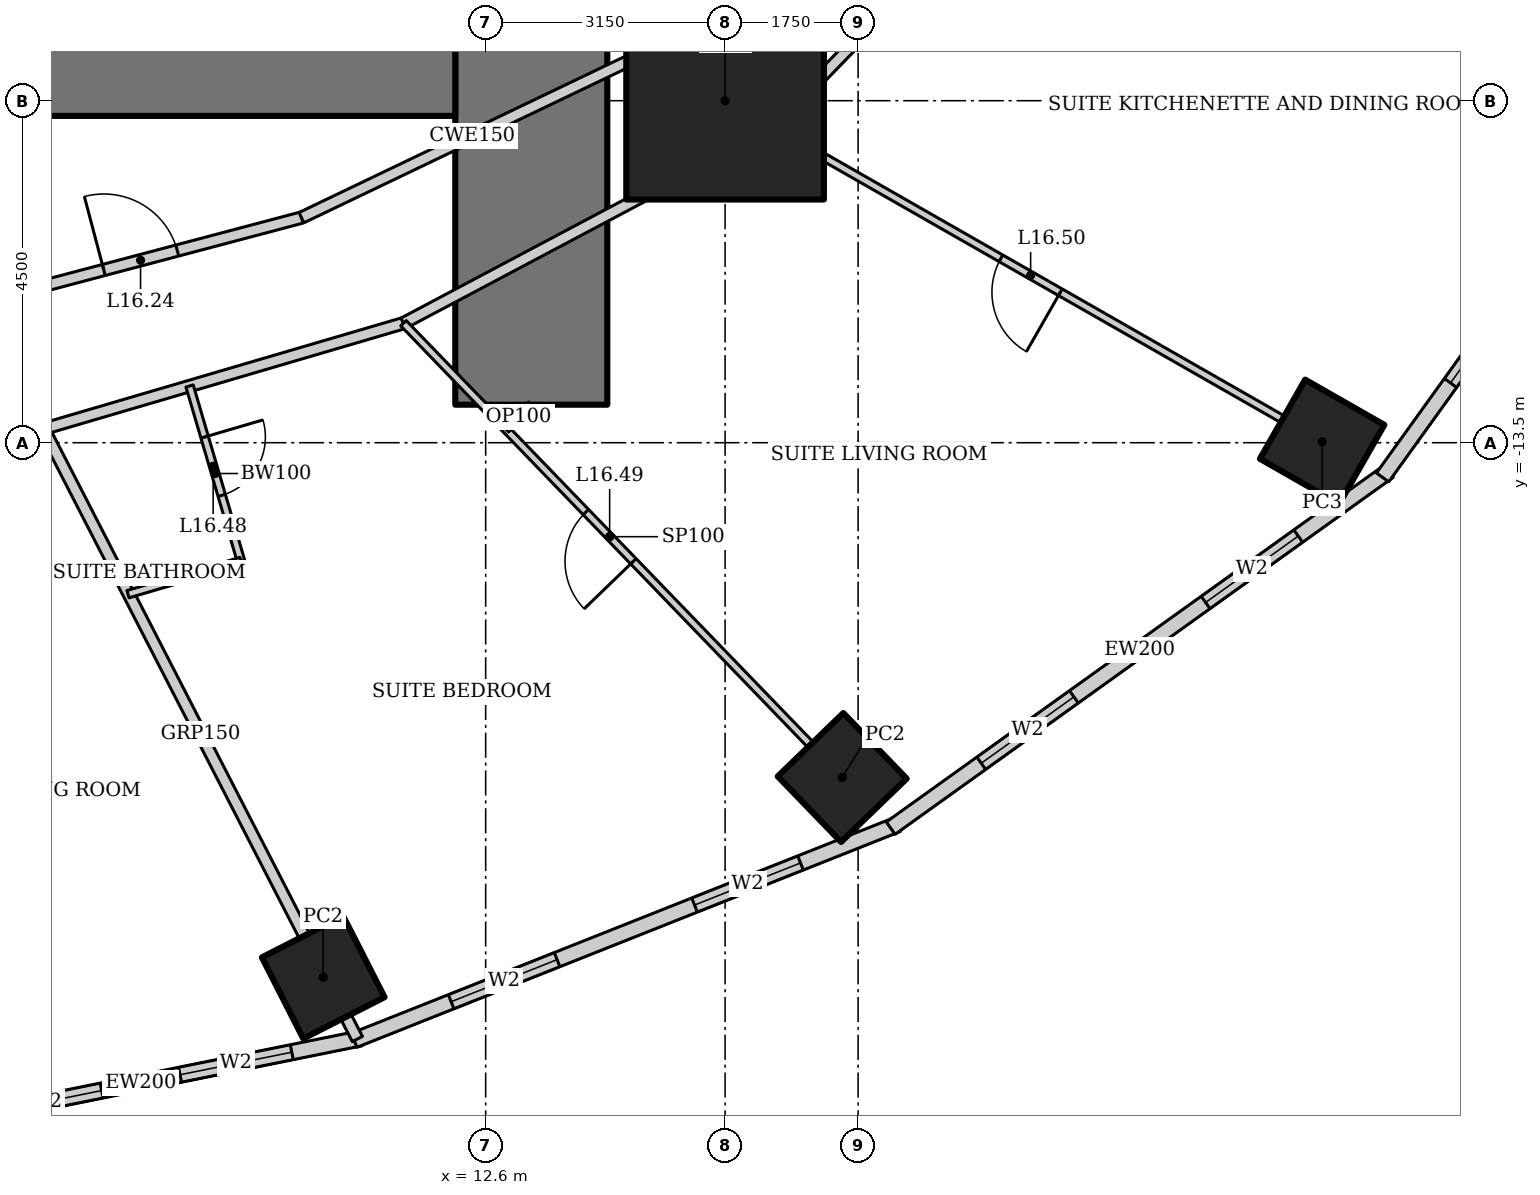
"""IFC4 building model, lengths in metres.
Left out: names, types, materials, properties, quantities, classifications, styles, units other than length and angle.
Written with IfcOpenShell. Run it as: python <this file> out.ifc"""

import sys

from ifc_helpers import new_model, si_unit, direction, frame, frame_2d, origin, origin_2d, place, context, subcontext, project, spatial, rectangle, hollow_rectangle, extrude, element, fill, save


model = new_model("IFC4")
c1 = context("Model", 3, precision=1e-05, world=origin(), true_north=direction((0.0, 1.0)))
c2 = subcontext(c1, "Body", "Model", "MODEL_VIEW")
j1 = project(units=[si_unit("LENGTHUNIT", "METRE"), si_unit("PLANEANGLEUNIT", "RADIAN")], contexts=[c1])
p1 = place(None, origin())
s1 = spatial("IfcSite", under=j1, at=p1, CompositionType="ELEMENT")
p2 = place(p1, origin())
s2 = spatial("IfcBuilding", under=s1, at=p2, CompositionType="ELEMENT")
p3 = place(p2, frame((0.0, 0.0, 73.0)))
s3 = spatial("IfcBuildingStorey", under=s2, at=p3, CompositionType="ELEMENT", Elevation=73.0)
p4 = place(p3, frame((15.75, -9.0, 0.0), z_axis=(0.0, 0.0, 1.0), x_axis=(1.0, 0.0, 0.0)))
e1 = element("IfcColumn", 1, at=p4, inside=s3, PredefinedType="COLUMN", context=c2, shape_type="SweptSolid", body=[
    extrude(hollow_rectangle(XDim=2.6, YDim=2.6, WallThickness=0.13, at=origin_2d()), origin(), (0.0, 0.0, 1.0), 3.6),
])
for number, where, z_axis, x_axis in (
    (2, (10.463, -20.534, 0.0), (0.0, 0.0, 1.0), (0.891, 0.454, 0.0)),
    (3, (17.291, -17.905, 0.0), (0.0, 0.0, 1.0), (0.719, 0.695, 0.0)),
):
    element("IfcColumn", number, at=place(p3, frame(where, z_axis=z_axis, x_axis=x_axis)), inside=s3, PredefinedType="COLUMN", context=c2, shape_type="SweptSolid", body=[
        extrude(hollow_rectangle(XDim=1.2, YDim=1.2, WallThickness=0.1, at=origin_2d()), origin(), (0.0, 0.0, 1.0), 3.6),
    ])
p5 = place(p3, frame((23.605, -13.489, 0.0), z_axis=(0.0, 0.0, 1.0), x_axis=(0.496139221777, 0.86824298017, 0.0)))
e4 = element("IfcColumn", 4, at=p5, inside=s3, PredefinedType="COLUMN", context=c2, shape_type="SweptSolid", body=[
    extrude(hollow_rectangle(XDim=1.2, YDim=1.2, WallThickness=0.12, at=origin_2d()), origin(), (0.0, 0.0, 1.0), 3.6),
])
p6 = place(p3, frame((13.2, -13.0, 0.0), z_axis=(0.0, 0.0, 1.0), x_axis=(0.0, 1.0, 0.0)))
e5 = element("IfcWall", 5, at=p6, inside=s3, PredefinedType="SHEAR", context=c2, shape_type="SweptSolid", body=[
    extrude(rectangle(XDim=26.0, YDim=2.0, at=frame_2d((13.0, 0.0))), origin(), (0.0, 0.0, 1.0), 3.6),
])
p7 = place(p6, frame((12.1, 0.0, 0.0)))
e6 = element("IfcOpeningElement", 6, at=p7, cuts=e5, PredefinedType="OPENING", context=c2, shape_type="SweptSolid", body=[
    extrude(rectangle(XDim=1.8, YDim=2.1, at=frame_2d((0.9, 1.05))), frame((0.0, 1.01, 0.0), z_axis=(0.0, -1.0, 0.0), x_axis=(1.0, 0.0, 0.0)), (0.0, 0.0, 1.0), 2.02),
])
p8 = place(p3, frame((-12.2, -8.0, 0.0), z_axis=(0.0, 0.0, 1.0), x_axis=(1.0, 0.0, 0.0)))
e7 = element("IfcWall", 7, at=p8, inside=s3, PredefinedType="SHEAR", context=c2, shape_type="SweptSolid", body=[
    extrude(rectangle(XDim=24.4, YDim=2.4, at=frame_2d((12.2, 0.0))), origin(), (0.0, 0.0, 1.0), 3.6),
])
p9 = place(p3, frame((5.17, -22.504, 0.0), z_axis=(0.0, 0.0, 1.0), x_axis=(0.980251657452, 0.197754110105, 0.0)))
e8 = element("IfcWall", 8, at=p9, inside=s3, PredefinedType="SOLIDWALL", context=c2, shape_type="SweptSolid", body=[
    extrude(rectangle(XDim=5.904, YDim=0.2, at=frame_2d((2.952, 0.0))), origin(), (0.0, 0.0, 1.0), 3.45),
])
p10 = place(p9, frame((0.926, 0.0, 0.5)))
e9 = element("IfcOpeningElement", 9, at=p10, cuts=e8, PredefinedType="OPENING", context=c2, shape_type="SweptSolid", body=[
    extrude(rectangle(XDim=1.5, YDim=2.2, at=frame_2d((0.75, 1.1))), frame((0.0, 0.11, 0.0), z_axis=(0.0, -1.0, 0.0), x_axis=(1.0, 0.0, 0.0)), (0.0, 0.0, 1.0), 0.22),
])
p11 = place(p9, frame((3.478, 0.0, 0.5)))
e10 = element("IfcOpeningElement", 10, at=p11, cuts=e8, PredefinedType="OPENING", context=c2, shape_type="SweptSolid", body=[
    extrude(rectangle(XDim=1.5, YDim=2.2, at=frame_2d((0.75, 1.1))), frame((0.0, 0.11, 0.0), z_axis=(0.0, -1.0, 0.0), x_axis=(1.0, 0.0, 0.0)), (0.0, 0.0, 1.0), 0.22),
])
p12 = place(p3, frame((10.869, -21.363, 0.0), z_axis=(0.0, 0.0, 1.0), x_axis=(0.929358351251, 0.369178892895, 0.0)))
e11 = element("IfcWall", 11, at=p12, inside=s3, PredefinedType="SOLIDWALL", context=c2, shape_type="SweptSolid", body=[
    extrude(rectangle(XDim=7.692, YDim=0.2, at=frame_2d((3.846, 0.0))), origin(), (0.0, 0.0, 1.0), 3.45),
])
p13 = place(p12, frame((1.373, 0.0, 0.5)))
e12 = element("IfcOpeningElement", 12, at=p13, cuts=e11, PredefinedType="OPENING", context=c2, shape_type="SweptSolid", body=[
    extrude(rectangle(XDim=1.5, YDim=2.2, at=frame_2d((0.75, 1.1))), frame((0.0, 0.11, 0.0), z_axis=(0.0, -1.0, 0.0), x_axis=(1.0, 0.0, 0.0)), (0.0, 0.0, 1.0), 0.22),
])
p14 = place(p12, frame((4.819, 0.0, 0.5)))
e13 = element("IfcOpeningElement", 13, at=p14, cuts=e11, PredefinedType="OPENING", context=c2, shape_type="SweptSolid", body=[
    extrude(rectangle(XDim=1.5, YDim=2.2, at=frame_2d((0.75, 1.1))), frame((0.0, 0.11, 0.0), z_axis=(0.0, -1.0, 0.0), x_axis=(1.0, 0.0, 0.0)), (0.0, 0.0, 1.0), 0.22),
])
p15 = place(p3, frame((17.929, -18.572, 0.0), z_axis=(0.0, 0.0, 1.0), x_axis=(0.812791321576, 0.582554948112, 0.0)))
e14 = element("IfcWall", 14, at=p15, inside=s3, PredefinedType="SOLIDWALL", context=c2, shape_type="SweptSolid", body=[
    extrude(rectangle(XDim=8.063, YDim=0.2, at=frame_2d((4.032, 0.0))), origin(), (0.0, 0.0, 1.0), 3.45),
])
p16 = place(p15, frame((1.466, 0.0, 0.5)))
e15 = element("IfcOpeningElement", 15, at=p16, cuts=e14, PredefinedType="OPENING", context=c2, shape_type="SweptSolid", body=[
    extrude(rectangle(XDim=1.5, YDim=2.2, at=frame_2d((0.75, 1.1))), frame((0.0, 0.11, 0.0), z_axis=(0.0, -1.0, 0.0), x_axis=(1.0, 0.0, 0.0)), (0.0, 0.0, 1.0), 0.22),
])
p17 = place(p15, frame((5.097, 0.0, 0.5)))
e16 = element("IfcOpeningElement", 16, at=p17, cuts=e14, PredefinedType="OPENING", context=c2, shape_type="SweptSolid", body=[
    extrude(rectangle(XDim=1.5, YDim=2.2, at=frame_2d((0.75, 1.1))), frame((0.0, 0.11, 0.0), z_axis=(0.0, -1.0, 0.0), x_axis=(1.0, 0.0, 0.0)), (0.0, 0.0, 1.0), 0.22),
])
p18 = place(p3, frame((24.4, -13.957, 0.0), z_axis=(0.0, 0.0, 1.0), x_axis=(0.583937613703, 0.811798536155, 0.0)))
e17 = element("IfcWall", 17, at=p18, inside=s3, PredefinedType="SOLIDWALL", context=c2, shape_type="SweptSolid", body=[
    extrude(rectangle(XDim=8.323, YDim=0.2, at=frame_2d((4.162, 0.0))), origin(), (0.0, 0.0, 1.0), 3.45),
])
p19 = place(p18, frame((1.531, 0.0, 0.5)))
e18 = element("IfcOpeningElement", 18, at=p19, cuts=e17, PredefinedType="OPENING", context=c2, shape_type="SweptSolid", body=[
    extrude(rectangle(XDim=1.5, YDim=2.2, at=frame_2d((0.75, 1.1))), frame((0.0, 0.11, 0.0), z_axis=(0.0, -1.0, 0.0), x_axis=(1.0, 0.0, 0.0)), (0.0, 0.0, 1.0), 0.22),
])
p20 = place(p18, frame((5.292, 0.0, 0.5)))
e19 = element("IfcOpeningElement", 19, at=p20, cuts=e17, PredefinedType="OPENING", context=c2, shape_type="SweptSolid", body=[
    extrude(rectangle(XDim=1.5, YDim=2.2, at=frame_2d((0.75, 1.1))), frame((0.0, 0.11, 0.0), z_axis=(0.0, -1.0, 0.0), x_axis=(1.0, 0.0, 0.0)), (0.0, 0.0, 1.0), 0.22),
])
p21 = place(p3, frame((10.912, -21.346, 0.0), z_axis=(0.0, 0.0, 1.0), x_axis=(-0.457117602022, 0.889406261458, 0.0)))
e20 = element("IfcWall", 20, at=p21, inside=s3, PredefinedType="PARTITIONING", context=c2, shape_type="SweptSolid", body=[
    extrude(rectangle(XDim=9.027, YDim=0.15, at=frame_2d((4.513, 0.0))), origin(), (0.0, 0.0, 1.0), 2.528),
])
p22 = place(p3, frame((6.786, -13.317, 0.0), z_axis=(0.0, 0.0, 1.0), x_axis=(0.959496227294, 0.281721475589, 0.0)))
e21 = element("IfcWall", 21, at=p22, inside=s3, PredefinedType="PARTITIONING", context=c2, shape_type="SweptSolid", body=[
    extrude(rectangle(XDim=4.933, YDim=0.15, at=frame_2d((2.466, 0.0))), origin(), (0.0, 0.0, 1.0), 3.45),
])
p23 = place(p3, frame((11.519, -11.928, 0.0), z_axis=(0.0, 0.0, 1.0), x_axis=(0.883334368785, 0.468743419071, 0.0)))
e22 = element("IfcWall", 22, at=p23, inside=s3, PredefinedType="PARTITIONING", context=c2, shape_type="SweptSolid", body=[
    extrude(rectangle(XDim=5.491, YDim=0.15, at=frame_2d((2.746, 0.0))), origin(), (0.0, 0.0, 1.0), 3.45),
])
p24 = place(p3, frame((16.369, -9.354, 0.0), z_axis=(0.0, 0.0, 1.0), x_axis=(0.695871090686, 0.71816671125, 0.0)))
e23 = element("IfcWall", 23, at=p24, inside=s3, PredefinedType="PARTITIONING", context=c2, shape_type="SweptSolid", body=[
    extrude(rectangle(XDim=5.913, YDim=0.15, at=frame_2d((2.957, 0.0))), origin(), (0.0, 0.0, 1.0), 3.45),
])
p25 = place(p24, frame((4.863, 0.0, 0.0)))
e24 = element("IfcOpeningElement", 24, at=p25, cuts=e23, PredefinedType="OPENING", context=c2, shape_type="SweptSolid", body=[
    extrude(rectangle(XDim=0.9, YDim=2.1, at=frame_2d((0.45, 1.05))), frame((0.0, 0.085, 0.0), z_axis=(0.0, -1.0, 0.0), x_axis=(1.0, 0.0, 0.0)), (0.0, 0.0, 1.0), 0.17),
])
p26 = place(p3, frame((5.941, -11.66, 0.0), z_axis=(0.0, 0.0, 1.0), x_axis=(0.966672790407, 0.256015070428, 0.0)))
e25 = element("IfcWall", 25, at=p26, inside=s3, PredefinedType="PARTITIONING", context=c2, shape_type="SweptSolid", body=[
    extrude(rectangle(XDim=4.382, YDim=0.15, at=frame_2d((2.191, 0.0))), origin(), (0.0, 0.0, 1.0), 3.45),
])
p27 = place(p26, frame((1.691, 0.0, 0.0)))
e26 = element("IfcOpeningElement", 26, at=p27, cuts=e25, PredefinedType="OPENING", context=c2, shape_type="SweptSolid", body=[
    extrude(rectangle(XDim=1.0, YDim=2.1, at=frame_2d((0.5, 1.05))), frame((0.0, 0.085, 0.0), z_axis=(0.0, -1.0, 0.0), x_axis=(1.0, 0.0, 0.0)), (0.0, 0.0, 1.0), 0.17),
])
p28 = place(p3, frame((10.177, -10.539, 0.0), z_axis=(0.0, 0.0, 1.0), x_axis=(0.901869692799, 0.43200816799, 0.0)))
e27 = element("IfcWall", 27, at=p28, inside=s3, PredefinedType="PARTITIONING", context=c2, shape_type="SweptSolid", body=[
    extrude(rectangle(XDim=4.986, YDim=0.15, at=frame_2d((2.493, 0.0))), origin(), (0.0, 0.0, 1.0), 3.45),
])
p29 = place(p3, frame((14.673, -8.385, 0.0), z_axis=(0.0, 0.0, 1.0), x_axis=(0.731260145007, 0.682098673452, 0.0)))
e28 = element("IfcWall", 28, at=p29, inside=s3, PredefinedType="PARTITIONING", context=c2, shape_type="SweptSolid", body=[
    extrude(rectangle(XDim=5.468, YDim=0.15, at=frame_2d((2.734, 0.0))), origin(), (0.0, 0.0, 1.0), 3.45),
])
p30 = place(p29, frame((2.234, 0.0, 0.0)))
e29 = element("IfcOpeningElement", 29, at=p30, cuts=e28, PredefinedType="OPENING", context=c2, shape_type="SweptSolid", body=[
    extrude(rectangle(XDim=1.0, YDim=2.1, at=frame_2d((0.5, 1.05))), frame((0.0, 0.085, 0.0), z_axis=(0.0, -1.0, 0.0), x_axis=(1.0, 0.0, 0.0)), (0.0, 0.0, 1.0), 0.17),
])
p31 = place(p3, frame((8.705, -12.754, 0.0), z_axis=(0.0, 0.0, 1.0), x_axis=(0.281659633817, -0.959514382736, 0.0)))
e30 = element("IfcWall", 30, at=p31, inside=s3, PredefinedType="PARTITIONING", context=c2, shape_type="SweptSolid", body=[
    extrude(rectangle(XDim=2.4, YDim=0.1, at=frame_2d((1.2, 0.0))), origin(), (0.0, 0.0, 1.0), 3.45),
])
p32 = place(p31, frame((0.7, 0.0, 0.0)))
e31 = element("IfcOpeningElement", 31, at=p32, cuts=e30, PredefinedType="OPENING", context=c2, shape_type="SweptSolid", body=[
    extrude(rectangle(XDim=0.8, YDim=2.1, at=frame_2d((0.4, 1.05))), frame((0.0, 0.06, 0.0), z_axis=(0.0, -1.0, 0.0), x_axis=(1.0, 0.0, 0.0)), (0.0, 0.0, 1.0), 0.12),
])
p33 = place(p3, frame((9.381, -15.057, 0.0), z_axis=(0.0, 0.0, 1.0), x_axis=(-0.959518451093, -0.281645773999, 0.0)))
e32 = element("IfcWall", 32, at=p33, inside=s3, PredefinedType="PARTITIONING", context=c2, shape_type="SweptSolid", body=[
    extrude(rectangle(XDim=1.549, YDim=0.1, at=frame_2d((0.774, 0.0))), origin(), (0.0, 0.0, 1.0), 3.45),
])
p34 = place(p3, frame((16.944, -17.545, 0.0), z_axis=(0.0, 0.0, 1.0), x_axis=(-0.694666479492, 0.719331969448, 0.0)))
e33 = element("IfcWall", 33, at=p34, inside=s3, PredefinedType="PARTITIONING", context=c2, shape_type="SweptSolid", body=[
    extrude(rectangle(XDim=7.81, YDim=0.1, at=frame_2d((3.905, 0.0))), origin(), (0.0, 0.0, 1.0), 2.528),
])
p35 = place(p34, frame((3.455, 0.0, 0.0)))
e34 = element("IfcOpeningElement", 34, at=p35, cuts=e33, PredefinedType="OPENING", context=c2, shape_type="SweptSolid", body=[
    extrude(rectangle(XDim=0.9, YDim=2.1, at=frame_2d((0.45, 1.05))), frame((0.0, 0.06, 0.0), z_axis=(0.0, -1.0, 0.0), x_axis=(1.0, 0.0, 0.0)), (0.0, 0.0, 1.0), 0.12),
])
p36 = place(p3, frame((23.171, -13.24, 0.0), z_axis=(0.0, 0.0, 1.0), x_axis=(-0.868243142124, 0.496138938357, 0.0)))
e35 = element("IfcWall", 35, at=p36, inside=s3, PredefinedType="PARTITIONING", context=c2, shape_type="SweptSolid", body=[
    extrude(rectangle(XDim=7.834, YDim=0.1, at=frame_2d((3.917, 0.0))), origin(), (0.0, 0.0, 1.0), 2.693),
])
p37 = place(p36, frame((3.467, 0.0, 0.0)))
e36 = element("IfcOpeningElement", 36, at=p37, cuts=e35, PredefinedType="OPENING", context=c2, shape_type="SweptSolid", body=[
    extrude(rectangle(XDim=0.9, YDim=2.1, at=frame_2d((0.45, 1.05))), frame((0.0, 0.06, 0.0), z_axis=(0.0, -1.0, 0.0), x_axis=(1.0, 0.0, 0.0)), (0.0, 0.0, 1.0), 0.12),
])
p38 = place(p3, frame((13.2, -13.0, 0.0), z_axis=(0.0, 0.0, 1.0), x_axis=(-0.719347134512, -0.69465077562, 0.0)))
e37 = element("IfcWall", 37, at=p38, inside=s3, PredefinedType="PARTITIONING", context=c2, shape_type="SweptSolid", body=[
    extrude(rectangle(XDim=0.465, YDim=0.1, at=frame_2d((0.232, 0.0))), origin(), (0.0, 0.0, 1.0), 3.45),
])
p39 = place(p10, origin())
e38 = element("IfcWindow", 38, at=p39, inside=s3, PartitioningType="SINGLE_PANEL", PredefinedType="WINDOW", context=c2, shape_type="SweptSolid", body=[
    extrude(rectangle(XDim=1.5, YDim=2.2, at=frame_2d((0.75, 1.1))), frame((0.0, 0.03, 0.0), z_axis=(0.0, -1.0, 0.0), x_axis=(1.0, 0.0, 0.0)), (0.0, 0.0, 1.0), 0.06),
])
fill(e9, e38)
p40 = place(p11, origin())
e39 = element("IfcWindow", 39, at=p40, inside=s3, PartitioningType="SINGLE_PANEL", PredefinedType="WINDOW", context=c2, shape_type="SweptSolid", body=[
    extrude(rectangle(XDim=1.5, YDim=2.2, at=frame_2d((0.75, 1.1))), frame((0.0, 0.03, 0.0), z_axis=(0.0, -1.0, 0.0), x_axis=(1.0, 0.0, 0.0)), (0.0, 0.0, 1.0), 0.06),
])
fill(e10, e39)
p41 = place(p13, origin())
e40 = element("IfcWindow", 40, at=p41, inside=s3, PartitioningType="SINGLE_PANEL", PredefinedType="WINDOW", context=c2, shape_type="SweptSolid", body=[
    extrude(rectangle(XDim=1.5, YDim=2.2, at=frame_2d((0.75, 1.1))), frame((0.0, 0.03, 0.0), z_axis=(0.0, -1.0, 0.0), x_axis=(1.0, 0.0, 0.0)), (0.0, 0.0, 1.0), 0.06),
])
fill(e12, e40)
p42 = place(p14, origin())
e41 = element("IfcWindow", 41, at=p42, inside=s3, PartitioningType="SINGLE_PANEL", PredefinedType="WINDOW", context=c2, shape_type="SweptSolid", body=[
    extrude(rectangle(XDim=1.5, YDim=2.2, at=frame_2d((0.75, 1.1))), frame((0.0, 0.03, 0.0), z_axis=(0.0, -1.0, 0.0), x_axis=(1.0, 0.0, 0.0)), (0.0, 0.0, 1.0), 0.06),
])
fill(e13, e41)
p43 = place(p16, origin())
e42 = element("IfcWindow", 42, at=p43, inside=s3, PartitioningType="SINGLE_PANEL", PredefinedType="WINDOW", context=c2, shape_type="SweptSolid", body=[
    extrude(rectangle(XDim=1.5, YDim=2.2, at=frame_2d((0.75, 1.1))), frame((0.0, 0.03, 0.0), z_axis=(0.0, -1.0, 0.0), x_axis=(1.0, 0.0, 0.0)), (0.0, 0.0, 1.0), 0.06),
])
fill(e15, e42)
p44 = place(p17, origin())
e43 = element("IfcWindow", 43, at=p44, inside=s3, PartitioningType="SINGLE_PANEL", PredefinedType="WINDOW", context=c2, shape_type="SweptSolid", body=[
    extrude(rectangle(XDim=1.5, YDim=2.2, at=frame_2d((0.75, 1.1))), frame((0.0, 0.03, 0.0), z_axis=(0.0, -1.0, 0.0), x_axis=(1.0, 0.0, 0.0)), (0.0, 0.0, 1.0), 0.06),
])
fill(e16, e43)
p45 = place(p19, origin())
e44 = element("IfcWindow", 44, at=p45, inside=s3, PartitioningType="SINGLE_PANEL", PredefinedType="WINDOW", context=c2, shape_type="SweptSolid", body=[
    extrude(rectangle(XDim=1.5, YDim=2.2, at=frame_2d((0.75, 1.1))), frame((0.0, 0.03, 0.0), z_axis=(0.0, -1.0, 0.0), x_axis=(1.0, 0.0, 0.0)), (0.0, 0.0, 1.0), 0.06),
])
fill(e18, e44)
p46 = place(p27, origin())
e45 = element("IfcDoor", 45, at=p46, inside=s3, OperationType="SINGLE_SWING_LEFT", PredefinedType="DOOR", context=c2, shape_type="SweptSolid", body=[
    extrude(rectangle(XDim=1.0, YDim=2.1, at=frame_2d((0.5, 1.05))), frame((0.0, 0.025, 0.0), z_axis=(0.0, -1.0, 0.0), x_axis=(1.0, 0.0, 0.0)), (0.0, 0.0, 1.0), 0.05),
])
fill(e26, e45)
p47 = place(p32, origin())
e46 = element("IfcDoor", 46, at=p47, inside=s3, OperationType="SINGLE_SWING_LEFT", PredefinedType="DOOR", context=c2, shape_type="SweptSolid", body=[
    extrude(rectangle(XDim=0.8, YDim=2.1, at=frame_2d((0.4, 1.05))), frame((0.0, 0.025, 0.0), z_axis=(0.0, -1.0, 0.0), x_axis=(1.0, 0.0, 0.0)), (0.0, 0.0, 1.0), 0.05),
])
fill(e31, e46)
p48 = place(p35, origin())
e47 = element("IfcDoor", 47, at=p48, inside=s3, OperationType="SINGLE_SWING_LEFT", PredefinedType="DOOR", context=c2, shape_type="SweptSolid", body=[
    extrude(rectangle(XDim=0.9, YDim=2.1, at=frame_2d((0.45, 1.05))), frame((0.0, 0.025, 0.0), z_axis=(0.0, -1.0, 0.0), x_axis=(1.0, 0.0, 0.0)), (0.0, 0.0, 1.0), 0.05),
])
fill(e34, e47)
p49 = place(p37, origin())
e48 = element("IfcDoor", 48, at=p49, inside=s3, OperationType="SINGLE_SWING_LEFT", PredefinedType="DOOR", context=c2, shape_type="SweptSolid", body=[
    extrude(rectangle(XDim=0.9, YDim=2.1, at=frame_2d((0.45, 1.05))), frame((0.0, 0.025, 0.0), z_axis=(0.0, -1.0, 0.0), x_axis=(1.0, 0.0, 0.0)), (0.0, 0.0, 1.0), 0.05),
])
fill(e36, e48)
save(model, sys.argv[1])
